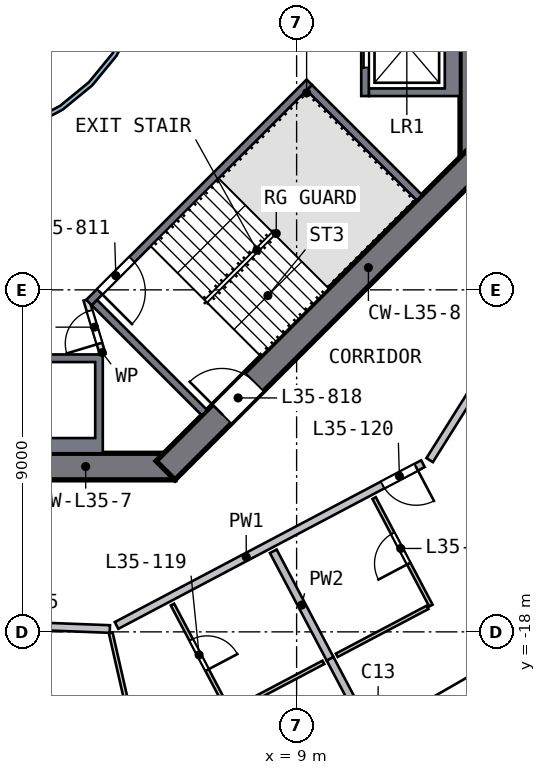
"""IFC4 building model, lengths in metres.
Left out: names, types, materials, properties, quantities, classifications, styles, units other than length and angle.
Written with IfcOpenShell. Run it as: python <this file> out.ifc"""

import sys

from ifc_helpers import new_model, si_unit, direction, frame, frame_2d, origin, place, context, subcontext, project, spatial, polyline, rectangle, outline, extrude, element, fill, save


model = new_model("IFC4")
c1 = context("Model", 3, precision=1e-05, world=origin(), true_north=direction((0.0, 1.0)))
c2 = subcontext(c1, "Body", "Model", "MODEL_VIEW")
j1 = project(units=[si_unit("LENGTHUNIT", "METRE"), si_unit("PLANEANGLEUNIT", "RADIAN")], contexts=[c1])
p1 = place(None, origin())
s1 = spatial("IfcSite", under=j1, at=p1, CompositionType="ELEMENT")
p2 = place(p1, origin())
s2 = spatial("IfcBuilding", under=s1, at=p2, CompositionType="ELEMENT")
p3 = place(p2, frame((0.0, 0.0, 147.0)))
s3 = spatial("IfcBuildingStorey", under=s2, at=p3, CompositionType="ELEMENT", Elevation=147.0)
p4 = place(p3, frame((13.65, -5.799, 0.0), z_axis=(0.0, 0.0, 1.0), x_axis=(0.0, 1.0, 0.0)))
e1 = element("IfcWall", 1, at=p4, inside=s3, PredefinedType="SHEAR", context=c2, shape_type="SweptSolid", body=[
    extrude(rectangle(XDim=11.598, YDim=0.7, at=frame_2d((5.799, 0.0))), origin(), (0.0, 0.0, 1.0), 3.5),
])
p5 = place(p4, frame((4.899, 0.0, 0.0)))
e2 = element("IfcOpeningElement", 2, at=p5, cuts=e1, PredefinedType="OPENING", context=c2, shape_type="SweptSolid", body=[
    extrude(rectangle(XDim=1.8, YDim=2.1, at=frame_2d((0.9, 1.05))), frame((0.0, 0.36, 0.0), z_axis=(0.0, -1.0, 0.0), x_axis=(1.0, 0.0, 0.0)), (0.0, 0.0, 1.0), 0.72),
])
p6 = place(p3, frame((-5.799, -13.65, 0.0), z_axis=(0.0, 0.0, 1.0), x_axis=(1.0, 0.0, 0.0)))
e3 = element("IfcWall", 3, at=p6, inside=s3, PredefinedType="SHEAR", context=c2, shape_type="SweptSolid", body=[
    extrude(rectangle(XDim=11.598, YDim=0.7, at=frame_2d((5.799, 0.0))), origin(), (0.0, 0.0, 1.0), 3.5),
])
p7 = place(p6, frame((4.899, 0.0, 0.0)))
e4 = element("IfcOpeningElement", 4, at=p7, cuts=e3, PredefinedType="OPENING", context=c2, shape_type="SweptSolid", body=[
    extrude(rectangle(XDim=1.8, YDim=2.1, at=frame_2d((0.9, 1.05))), frame((0.0, 0.36, 0.0), z_axis=(0.0, -1.0, 0.0), x_axis=(1.0, 0.0, 0.0)), (0.0, 0.0, 1.0), 0.72),
])
p8 = place(p3, frame((5.552, -13.752, 0.0), z_axis=(0.0, 0.0, 1.0), x_axis=(0.707106781, 0.707106781, 0.0)))
e5 = element("IfcWall", 5, at=p8, inside=s3, PredefinedType="SHEAR", context=c2, shape_type="SweptSolid", body=[
    extrude(rectangle(XDim=11.598, YDim=0.7, at=frame_2d((5.799, 0.0))), origin(), (0.0, 0.0, 1.0), 3.5),
])
p9 = place(p8, frame((2.099, 0.0, 0.0)))
e6 = element("IfcOpeningElement", 6, at=p9, cuts=e5, PredefinedType="OPENING", context=c2, shape_type="SweptSolid", body=[
    extrude(rectangle(XDim=1.2, YDim=2.1, at=frame_2d((0.6, 1.05))), frame((0.0, 0.36, 0.0), z_axis=(0.0, -1.0, 0.0), x_axis=(1.0, 0.0, 0.0)), (0.0, 0.0, 1.0), 0.72),
])
p10 = place(p3, origin())
e7 = element("IfcWall", 7, at=p10, inside=s3, PredefinedType="SOLIDWALL", context=c2, shape_type="SweptSolid", body=[
    extrude(outline(polyline([(13.3, -3.9), (10.9, -3.9), (10.9, -3.7), (12.9, -3.7), (12.9, -1.4), (10.9, -1.4), (10.9, -1.2), (13.3, -1.2), (13.3, -3.9)])), origin(), (0.0, 0.0, 1.0), 3.19),
])
p11 = place(p3, frame((10.8, -1.2, 0.0), z_axis=(0.0, 0.0, 1.0), x_axis=(0.0, -1.0, 0.0)))
e8 = element("IfcWall", 8, at=p11, inside=s3, PredefinedType="SOLIDWALL", context=c2, shape_type="SweptSolid", body=[
    extrude(rectangle(XDim=2.7, YDim=0.2, at=frame_2d((1.35, 0.0))), origin(), (0.0, 0.0, 1.0), 3.19),
])
p12 = place(p11, frame((0.75, 0.0, 0.0)))
e9 = element("IfcOpeningElement", 9, at=p12, cuts=e8, PredefinedType="OPENING", context=c2, shape_type="SweptSolid", body=[
    extrude(rectangle(XDim=1.2, YDim=2.1, at=frame_2d((0.6, 1.05))), frame((0.0, 0.11, 0.0), z_axis=(0.0, -1.0, 0.0), x_axis=(1.0, 0.0, 0.0)), (0.0, 0.0, 1.0), 0.22),
])
p13 = place(p3, origin())
e10 = element("IfcWall", 10, at=p13, inside=s3, PredefinedType="SOLIDWALL", context=c2, shape_type="SweptSolid", body=[
    extrude(outline(polyline([(3.9, -10.7), (3.9, -13.3), (1.2, -13.3), (1.2, -10.7), (3.9, -10.7)]), holes=[polyline([(1.4, -12.9), (3.7, -12.9), (3.7, -10.9), (1.4, -10.9), (1.4, -12.9)])]), origin(), (0.0, 0.0, 1.0), 3.19),
])
p14 = place(p3, frame((9.334, -3.535, 0.0), z_axis=(0.0, 0.0, 1.0), x_axis=(-0.707106781, -0.707106781, 0.0)))
e11 = element("IfcWall", 11, at=p14, inside=s3, PredefinedType="SOLIDWALL", context=c2, shape_type="SweptSolid", body=[
    extrude(rectangle(XDim=8.2, YDim=0.2, at=frame_2d((4.1, 0.0))), origin(), (0.0, 0.0, 1.0), 3.19),
])
p15 = place(p14, frame((6.6, 0.0, 0.0)))
e12 = element("IfcOpeningElement", 12, at=p15, cuts=e11, PredefinedType="OPENING", context=c2, shape_type="SweptSolid", body=[
    extrude(rectangle(XDim=1.2, YDim=2.1, at=frame_2d((0.6, 1.05))), frame((0.0, 0.11, 0.0), z_axis=(0.0, -1.0, 0.0), x_axis=(1.0, 0.0, 0.0)), (0.0, 0.0, 1.0), 0.22),
])
for number, where, z_axis, x_axis in (
    (13, (3.677, -9.334, 0.0), (0.0, 0.0, 1.0), (0.707, -0.707, 0.0)),
    (14, (9.334, -3.677, 0.0), (0.0, 0.0, 1.0), (0.707, -0.707, 0.0)),
):
    element("IfcWall", number, at=place(p3, frame(where, z_axis=z_axis, x_axis=x_axis)), inside=s3, PredefinedType="SOLIDWALL", context=c2, shape_type="SweptSolid", body=[
        extrude(rectangle(XDim=4.1, YDim=0.2, at=frame_2d((2.05, 0.0))), origin(), (0.0, 0.0, 1.0), 3.19),
    ])
p16 = place(p3, frame((3.9, -10.7, 0.0), z_axis=(0.0, 0.0, 1.0), x_axis=(-0.289808785, 0.957084567, 0.0)))
e15 = element("IfcWall", 15, at=p16, inside=s3, PredefinedType="PARTITIONING", context=c2, shape_type="SweptSolid", body=[
    extrude(rectangle(XDim=1.501, YDim=0.15, at=frame_2d((0.75, 0.0))), origin(), (0.0, 0.0, 1.0), 3.19),
])
p17 = place(p16, frame((0.301, 0.0, 0.0)))
e16 = element("IfcOpeningElement", 16, at=p17, cuts=e15, PredefinedType="OPENING", context=c2, shape_type="SweptSolid", body=[
    extrude(rectangle(XDim=0.9, YDim=2.1, at=frame_2d((0.45, 1.05))), frame((0.0, 0.085, 0.0), z_axis=(0.0, -1.0, 0.0), x_axis=(1.0, 0.0, 0.0)), (0.0, 0.0, 1.0), 0.17),
])
p18 = place(p3, origin())
e17 = element("IfcWall", 17, at=p18, inside=s3, PredefinedType="SOLIDWALL", context=c2, shape_type="SweptSolid", body=[
    extrude(outline(polyline([(5.021, -0.999), (4.73, -1.959), (4.257, -2.844), (3.62, -3.62), (2.844, -4.257), (1.959, -4.73), (0.999, -5.021), (0.0, -5.12), (-0.999, -5.021), (-1.959, -4.73), (-2.844, -4.257), (-3.62, -3.62), (-4.257, -2.844), (-4.73, -1.959), (-5.021, -0.999), (-5.12, 0.0), (-5.021, 0.999), (-4.73, 1.959), (-4.257, 2.844), (-3.62, 3.62), (-2.844, 4.257), (-1.959, 4.73), (-0.999, 5.021), (0.0, 5.12), (0.999, 5.021), (1.959, 4.73), (2.844, 4.257), (3.62, 3.62), (4.257, 2.844), (4.73, 1.959), (5.021, 0.999), (5.12, 0.0), (5.021, -0.999)]), holes=[polyline([(4.904, 0.976), (4.619, 1.913), (4.157, 2.778), (3.535, 3.535), (2.778, 4.157), (1.913, 4.619), (0.976, 4.904), (0.0, 5.0), (-0.976, 4.904), (-1.913, 4.619), (-2.778, 4.157), (-3.535, 3.535), (-4.157, 2.778), (-4.619, 1.913), (-4.904, 0.976), (-5.0, 0.0), (-4.904, -0.976), (-4.619, -1.913), (-4.157, -2.778), (-3.535, -3.535), (-2.778, -4.157), (-1.913, -4.619), (-0.976, -4.904), (0.0, -5.0), (0.976, -4.904), (1.913, -4.619), (2.778, -4.157), (3.535, -3.535), (4.157, -2.778), (4.619, -1.913), (4.904, -0.976), (5.0, 0.0), (4.904, 0.976)])]), origin(), (0.0, 0.0, 1.0), 3.19),
])
p19 = place(p3, frame((4.086, -17.925, 0.0), z_axis=(0.0, 0.0, 1.0), x_axis=(-0.999289656, 0.037685326, 0.0)))
e18 = element("IfcWall", 18, at=p19, inside=s3, PredefinedType="SOLIDWALL", context=c2, shape_type="SweptSolid", body=[
    extrude(rectangle(XDim=9.517, YDim=0.2, at=frame_2d((4.758, 0.0))), origin(), (0.0, 0.0, 1.0), 3.19),
])
p20 = place(p19, frame((1.9, 0.0, 0.0)))
e19 = element("IfcOpeningElement", 19, at=p20, cuts=e18, PredefinedType="OPENING", context=c2, shape_type="SweptSolid", body=[
    extrude(rectangle(XDim=1.0, YDim=2.1, at=frame_2d((0.5, 1.05))), frame((0.0, 0.11, 0.0), z_axis=(0.0, -1.0, 0.0), x_axis=(1.0, 0.0, 0.0)), (0.0, 0.0, 1.0), 0.22),
])
p21 = place(p3, frame((12.323, -13.574, 0.0), z_axis=(0.0, 0.0, 1.0), x_axis=(-0.8842539, -0.467006467, 0.0)))
e20 = element("IfcWall", 20, at=p21, inside=s3, PredefinedType="SOLIDWALL", context=c2, shape_type="SweptSolid", body=[
    extrude(rectangle(XDim=9.116, YDim=0.2, at=frame_2d((4.558, 0.0))), origin(), (0.0, 0.0, 1.0), 3.19),
])
p22 = place(p21, frame((0.2, 0.0, 0.0)))
e21 = element("IfcOpeningElement", 21, at=p22, cuts=e20, PredefinedType="OPENING", context=c2, shape_type="SweptSolid", body=[
    extrude(rectangle(XDim=1.0, YDim=2.1, at=frame_2d((0.5, 1.05))), frame((0.0, 0.11, 0.0), z_axis=(0.0, -1.0, 0.0), x_axis=(1.0, 0.0, 0.0)), (0.0, 0.0, 1.0), 0.22),
])
p23 = place(p3, frame((12.501, -13.48, 0.0), z_axis=(0.0, 0.0, 1.0), x_axis=(0.532282406, 0.846566855, 0.0)))
e22 = element("IfcWall", 22, at=p23, inside=s3, PredefinedType="SOLIDWALL", context=c2, shape_type="SweptSolid", body=[
    extrude(rectangle(XDim=9.516, YDim=0.2, at=frame_2d((4.758, 0.0))), origin(), (0.0, 0.0, 1.0), 3.19),
])
p24 = place(p3, frame((8.387, -15.88, 0.0), z_axis=(0.0, 0.0, 1.0), x_axis=(0.466969105, -0.884273631, 0.0)))
e23 = element("IfcWall", 23, at=p24, inside=s3, PredefinedType="SOLIDWALL", context=c2, shape_type="SweptSolid", body=[
    extrude(rectangle(XDim=3.2, YDim=0.2, at=frame_2d((1.6, 0.0))), origin(), (0.0, 0.0, 1.0), 3.19),
])
p25 = place(p3, frame((9.881, -18.709, 0.0), z_axis=(0.0, 0.0, 1.0), x_axis=(0.46703191, -0.884240462, 0.0)))
e24 = element("IfcWall", 24, at=p25, inside=s3, PredefinedType="SOLIDWALL", context=c2, shape_type="SweptSolid", body=[
    extrude(rectangle(XDim=2.95, YDim=0.2, at=frame_2d((1.475, 0.0))), origin(), (0.0, 0.0, 1.0), 3.19),
])
p26 = place(p3, frame((4.109, -18.026, 0.0), z_axis=(0.0, 0.0, 1.0), x_axis=(0.222204416, -0.975000101, 0.0)))
e25 = element("IfcWall", 25, at=p26, inside=s3, PredefinedType="PARTITIONING", context=c2, shape_type="SweptSolid", body=[
    extrude(rectangle(XDim=6.476, YDim=0.1, at=frame_2d((3.238, 0.0))), origin(), (0.0, 0.0, 1.0), 3.19),
])
p27 = place(p26, frame((3.55, 0.0, 0.0)))
e26 = element("IfcOpeningElement", 26, at=p27, cuts=e25, PredefinedType="OPENING", context=c2, shape_type="SweptSolid", body=[
    extrude(rectangle(XDim=1.0, YDim=2.1, at=frame_2d((0.5, 1.05))), frame((0.0, 0.06, 0.0), z_axis=(0.0, -1.0, 0.0), x_axis=(1.0, 0.0, 0.0)), (0.0, 0.0, 1.0), 0.12),
])
p28 = place(p3, frame((5.734, -17.281, 0.0), z_axis=(0.0, 0.0, 1.0), x_axis=(0.467000609, -0.884256994, 0.0)))
e27 = element("IfcWall", 27, at=p28, inside=s3, PredefinedType="PARTITIONING", context=c2, shape_type="SweptSolid", body=[
    extrude(rectangle(XDim=3.2, YDim=0.1, at=frame_2d((1.6, 0.0))), origin(), (0.0, 0.0, 1.0), 3.19),
])
p29 = place(p28, frame((1.05, 0.0, 0.0)))
e28 = element("IfcOpeningElement", 28, at=p29, cuts=e27, PredefinedType="OPENING", context=c2, shape_type="SweptSolid", body=[
    extrude(rectangle(XDim=0.9, YDim=2.1, at=frame_2d((0.45, 1.05))), frame((0.0, 0.06, 0.0), z_axis=(0.0, -1.0, 0.0), x_axis=(1.0, 0.0, 0.0)), (0.0, 0.0, 1.0), 0.12),
])
for number, where, z_axis, x_axis in (
    (29, (7.317, -20.064, 0.0), (0.0, 0.0, 1.0), (0.884, 0.467, 0.0)),
    (30, (12.445, -17.355, 0.0), (0.0, 0.0, 1.0), (-0.884, -0.467, 0.0)),
):
    element("IfcWall", number, at=place(p3, frame(where, z_axis=z_axis, x_axis=x_axis)), inside=s3, PredefinedType="PARTITIONING", context=c2, shape_type="SweptSolid", body=[
        extrude(rectangle(XDim=2.7, YDim=0.1, at=frame_2d((1.35, 0.0))), origin(), (0.0, 0.0, 1.0), 3.19),
    ])
p30 = place(p3, frame((12.534, -17.308, 0.0), z_axis=(0.0, 0.0, 1.0), x_axis=(-0.467000609, 0.884256994, 0.0)))
e31 = element("IfcWall", 31, at=p30, inside=s3, PredefinedType="PARTITIONING", context=c2, shape_type="SweptSolid", body=[
    extrude(rectangle(XDim=3.2, YDim=0.1, at=frame_2d((1.6, 0.0))), origin(), (0.0, 0.0, 1.0), 3.19),
])
p31 = place(p30, frame((1.25, 0.0, 0.0)))
e32 = element("IfcOpeningElement", 32, at=p31, cuts=e31, PredefinedType="OPENING", context=c2, shape_type="SweptSolid", body=[
    extrude(rectangle(XDim=0.9, YDim=2.1, at=frame_2d((0.45, 1.05))), frame((0.0, 0.06, 0.0), z_axis=(0.0, -1.0, 0.0), x_axis=(1.0, 0.0, 0.0)), (0.0, 0.0, 1.0), 0.12),
])
p32 = place(p12, origin())
e33 = element("IfcDoor", 33, at=p32, inside=s3, OperationType="DOUBLE_DOOR_SLIDING", PredefinedType="DOOR", context=c2, shape_type="SweptSolid", body=[
    extrude(rectangle(XDim=1.2, YDim=2.1, at=frame_2d((0.6, 1.05))), frame((0.0, 0.025, 0.0), z_axis=(0.0, -1.0, 0.0), x_axis=(1.0, 0.0, 0.0)), (0.0, 0.0, 1.0), 0.05),
])
fill(e9, e33)
p33 = place(p15, origin())
e34 = element("IfcDoor", 34, at=p33, inside=s3, OperationType="SINGLE_SWING_RIGHT", PredefinedType="DOOR", context=c2, shape_type="SweptSolid", body=[
    extrude(rectangle(XDim=1.2, YDim=2.1, at=frame_2d((0.6, 1.05))), frame((0.0, 0.025, 0.0), z_axis=(0.0, -1.0, 0.0), x_axis=(1.0, 0.0, 0.0)), (0.0, 0.0, 1.0), 0.05),
])
fill(e12, e34)
p34 = place(p9, origin())
e35 = element("IfcDoor", 35, at=p34, inside=s3, OperationType="SINGLE_SWING_LEFT", PredefinedType="DOOR", context=c2, shape_type="SweptSolid", body=[
    extrude(rectangle(XDim=1.2, YDim=2.1, at=frame_2d((0.6, 1.05))), frame((0.0, 0.025, 0.0), z_axis=(0.0, -1.0, 0.0), x_axis=(1.0, 0.0, 0.0)), (0.0, 0.0, 1.0), 0.05),
])
fill(e6, e35)
p35 = place(p17, origin())
e36 = element("IfcDoor", 36, at=p35, inside=s3, OperationType="SINGLE_SWING_LEFT", PredefinedType="DOOR", context=c2, shape_type="SweptSolid", body=[
    extrude(rectangle(XDim=0.9, YDim=2.1, at=frame_2d((0.45, 1.05))), frame((0.0, 0.025, 0.0), z_axis=(0.0, -1.0, 0.0), x_axis=(1.0, 0.0, 0.0)), (0.0, 0.0, 1.0), 0.05),
])
fill(e16, e36)
p36 = place(p29, origin())
e37 = element("IfcDoor", 37, at=p36, inside=s3, OperationType="SINGLE_SWING_RIGHT", PredefinedType="DOOR", context=c2, shape_type="SweptSolid", body=[
    extrude(rectangle(XDim=0.9, YDim=2.1, at=frame_2d((0.45, 1.05))), frame((0.0, 0.025, 0.0), z_axis=(0.0, -1.0, 0.0), x_axis=(1.0, 0.0, 0.0)), (0.0, 0.0, 1.0), 0.05),
])
fill(e28, e37)
p37 = place(p22, origin())
e38 = element("IfcDoor", 38, at=p37, inside=s3, OperationType="SINGLE_SWING_LEFT", PredefinedType="DOOR", context=c2, shape_type="SweptSolid", body=[
    extrude(rectangle(XDim=1.0, YDim=2.1, at=frame_2d((0.5, 1.05))), frame((0.0, 0.025, 0.0), z_axis=(0.0, -1.0, 0.0), x_axis=(1.0, 0.0, 0.0)), (0.0, 0.0, 1.0), 0.05),
])
fill(e21, e38)
p38 = place(p31, origin())
e39 = element("IfcDoor", 39, at=p38, inside=s3, OperationType="SINGLE_SWING_LEFT", PredefinedType="DOOR", context=c2, shape_type="SweptSolid", body=[
    extrude(rectangle(XDim=0.9, YDim=2.1, at=frame_2d((0.45, 1.05))), frame((0.0, 0.025, 0.0), z_axis=(0.0, -1.0, 0.0), x_axis=(1.0, 0.0, 0.0)), (0.0, 0.0, 1.0), 0.05),
])
fill(e32, e39)
save(model, sys.argv[1])
